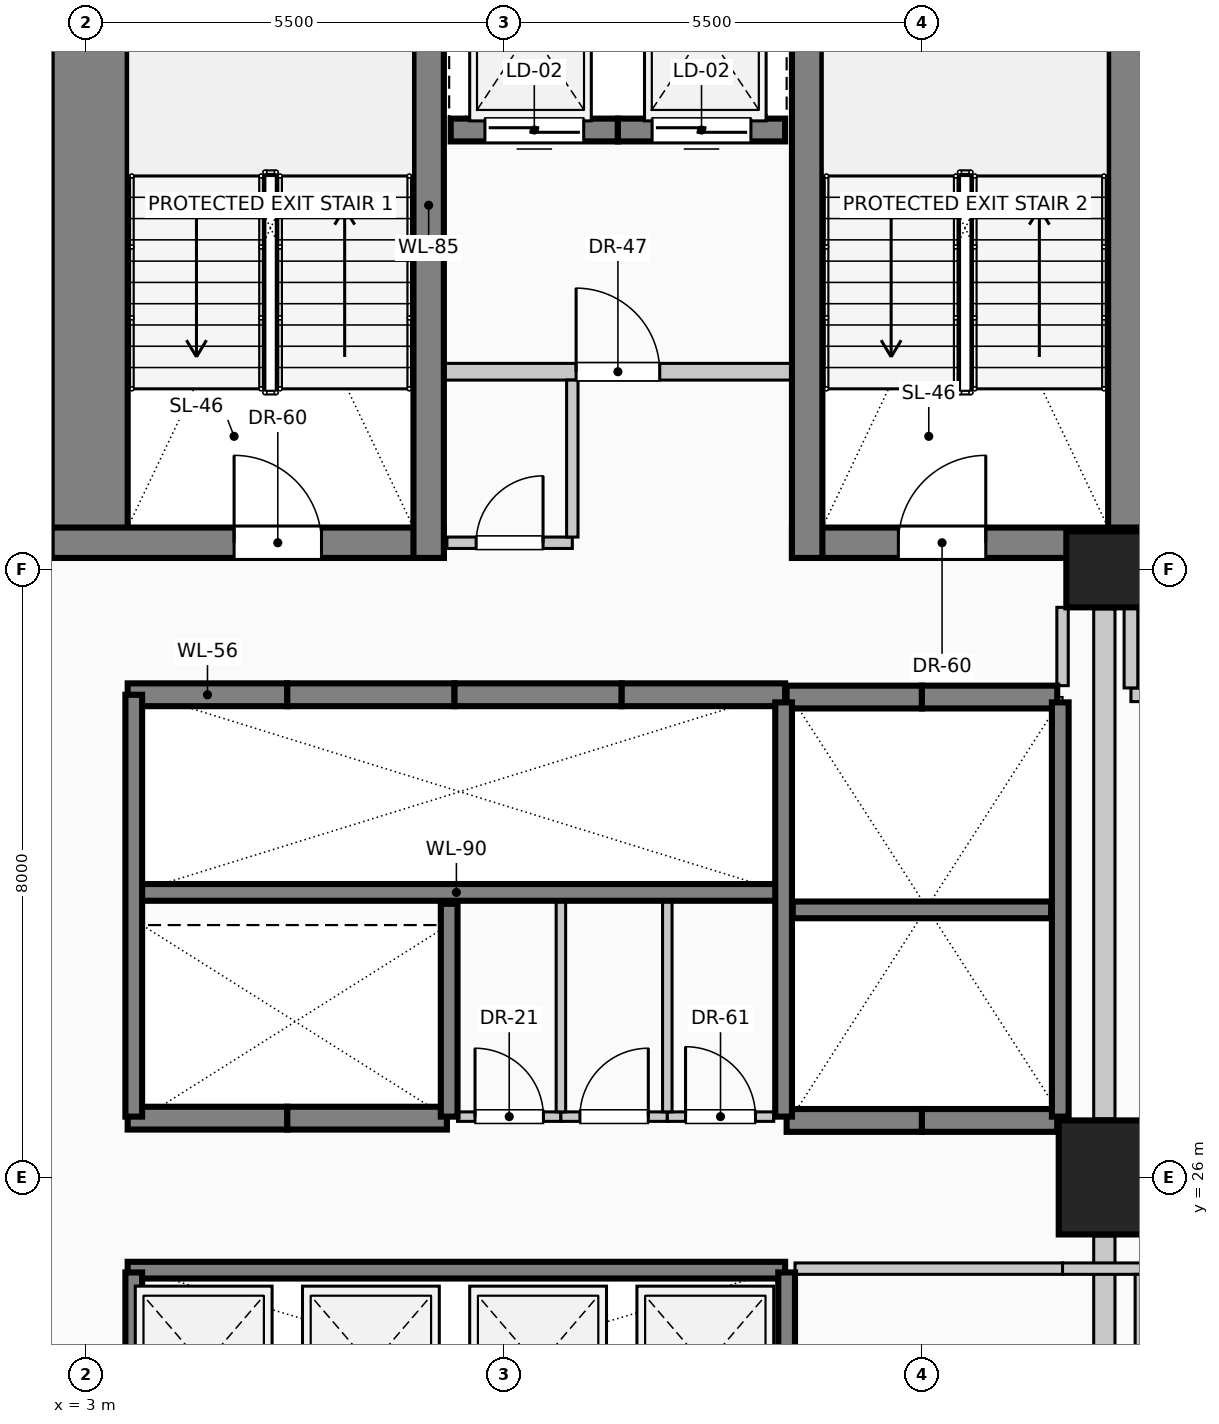
"""IFC4 building model, lengths in metres.
Left out: names, types, materials, properties, quantities, classifications, styles, units other than length and angle.
Written with IfcOpenShell. Run it as: python <this file> out.ifc"""

import sys

from ifc_helpers import new_model, si_unit, direction, frame, frame_2d, origin, origin_2d, place, context, subcontext, project, spatial, rectangle, circle, extrude, element, fill, save


model = new_model("IFC4")
c1 = context("Model", 3, precision=1e-05, world=origin(), true_north=direction((0.0, 1.0)))
c2 = subcontext(c1, "Body", "Model", "MODEL_VIEW")
j1 = project(units=[si_unit("LENGTHUNIT", "METRE"), si_unit("PLANEANGLEUNIT", "RADIAN")], contexts=[c1])
p1 = place(None, origin())
s1 = spatial("IfcSite", under=j1, at=p1, CompositionType="ELEMENT")
p2 = place(p1, origin())
s2 = spatial("IfcBuilding", under=s1, at=p2, CompositionType="ELEMENT")
p3 = place(p2, frame((0.0, 0.0, 42.6)))
s3 = spatial("IfcBuildingStorey", under=s2, at=p3, CompositionType="ELEMENT", Elevation=42.6)
for number, where, z_axis, x_axis in (
    (1, (3.05, 34.15, 0.0), (0.0, 0.0, 1.0), (0.0, 1.0, 0.0)),
    (2, (16.95, 34.15, 0.0), (0.0, 0.0, 1.0), (0.0, 1.0, 0.0)),
):
    element("IfcWall", number, at=place(p3, frame(where, z_axis=z_axis, x_axis=x_axis)), inside=s3, PredefinedType="SHEAR", context=c2, shape_type="SweptSolid", body=[
        extrude(rectangle(XDim=9.28, YDim=1.0, at=frame_2d((4.64, 0.0))), origin(), (0.0, 0.0, 1.0), 4.0),
    ])
p4 = place(p3, frame((2.55, 34.35, 0.0), z_axis=(0.0, 0.0, 1.0), x_axis=(1.0, 0.0, 0.0)))
e3 = element("IfcWall", 3, at=p4, inside=s3, PredefinedType="SHEAR", context=c2, shape_type="SweptSolid", body=[
    extrude(rectangle(XDim=5.16, YDim=0.4, at=frame_2d((2.58, 0.0))), origin(), (0.0, 0.0, 1.0), 4.0),
])
p5 = place(p4, frame((2.4, 0.0, 0.0)))
e4 = element("IfcOpeningElement", 4, at=p5, cuts=e3, PredefinedType="OPENING", context=c2, shape_type="SweptSolid", body=[
    extrude(rectangle(XDim=1.15, YDim=2.2, at=frame_2d((0.575, 1.1))), frame((0.0, 0.21, 0.0), z_axis=(0.0, -1.0, 0.0), x_axis=(1.0, 0.0, 0.0)), (0.0, 0.0, 1.0), 0.42),
])
p6 = place(p3, frame((12.29, 34.35, 0.0), z_axis=(0.0, 0.0, 1.0), x_axis=(1.0, 0.0, 0.0)))
e5 = element("IfcWall", 5, at=p6, inside=s3, PredefinedType="SHEAR", context=c2, shape_type="SweptSolid", body=[
    extrude(rectangle(XDim=5.16, YDim=0.4, at=frame_2d((2.58, 0.0))), origin(), (0.0, 0.0, 1.0), 4.0),
])
p7 = place(p6, frame((1.4, 0.0, 0.0)))
e6 = element("IfcOpeningElement", 6, at=p7, cuts=e5, PredefinedType="OPENING", context=c2, shape_type="SweptSolid", body=[
    extrude(rectangle(XDim=1.15, YDim=2.2, at=frame_2d((0.575, 1.1))), frame((0.0, 0.21, 0.0), z_axis=(0.0, -1.0, 0.0), x_axis=(1.0, 0.0, 0.0)), (0.0, 0.0, 1.0), 0.42),
])
for number, where, z_axis, x_axis in (
    (7, (7.51, 34.15, 0.0), (0.0, 0.0, 1.0), (0.0, 1.0, 0.0)),
    (8, (12.49, 34.15, 0.0), (0.0, 0.0, 1.0), (0.0, 1.0, 0.0)),
):
    element("IfcWall", number, at=place(p3, frame(where, z_axis=z_axis, x_axis=x_axis)), inside=s3, PredefinedType="SHEAR", context=c2, shape_type="SweptSolid", body=[
        extrude(rectangle(XDim=9.28, YDim=0.4, at=frame_2d((4.64, 0.0))), origin(), (0.0, 0.0, 1.0), 4.0),
    ])
p8 = place(p3, frame((16.4, 26.0, 0.0), z_axis=(0.0, 0.0, 1.0), x_axis=(1.0, 0.0, 0.0)))
e9 = element("IfcColumn", 9, at=p8, inside=s3, PredefinedType="COLUMN", context=c2, shape_type="SweptSolid", body=[
    extrude(rectangle(XDim=1.2, YDim=1.5, at=origin_2d()), origin(), (0.0, 0.0, 1.0), 4.0),
])
p9 = place(p3, frame((16.4, 34.0, 0.0), z_axis=(0.0, 0.0, 1.0), x_axis=(1.0, 0.0, 0.0)))
e10 = element("IfcColumn", 10, at=p9, inside=s3, PredefinedType="COLUMN", context=c2, shape_type="SweptSolid", body=[
    extrude(circle(Radius=0.5, at=origin_2d()), origin(), (0.0, 0.0, 1.0), 4.0),
])
p10 = place(p3, frame((16.4, 25.23, 0.0), z_axis=(0.0, 0.0, 1.0), x_axis=(0.0, -1.0, 0.0)))
e11 = element("IfcWall", 11, at=p10, inside=s3, PredefinedType="SOLIDWALL", context=c2, shape_type="SweptSolid", body=[
    extrude(rectangle(XDim=6.46, YDim=0.28, at=frame_2d((3.23, 0.0))), origin(), (0.0, 0.0, 1.0), 3.0),
])
p11 = place(p3, frame((16.4, 33.48, 0.0), z_axis=(0.0, 0.0, 1.0), x_axis=(0.0, -1.0, 0.0)))
e12 = element("IfcWall", 12, at=p11, inside=s3, PredefinedType="SOLIDWALL", context=c2, shape_type="SweptSolid", body=[
    extrude(rectangle(XDim=6.71, YDim=0.28, at=frame_2d((3.355, 0.0))), origin(), (0.0, 0.0, 1.0), 3.0),
])
for number, where, z_axis, x_axis in (
    (13, (14.0, 26.75, 0.0), (0.0, 0.0, 1.0), (-1.0, 0.0, 0.0)),
    (14, (15.78, 26.75, 0.0), (0.0, 0.0, 1.0), (-1.0, 0.0, 0.0)),
    (15, (12.22, 32.32, 0.0), (0.0, 0.0, 1.0), (1.0, 0.0, 0.0)),
    (16, (14.0, 32.32, 0.0), (0.0, 0.0, 1.0), (1.0, 0.0, 0.0)),
):
    element("IfcWall", number, at=place(p3, frame(where, z_axis=z_axis, x_axis=x_axis)), inside=s3, PredefinedType="SOLIDWALL", context=c2, shape_type="SweptSolid", body=[
        extrude(rectangle(XDim=1.78, YDim=0.3, at=frame_2d((0.89, 0.0))), origin(), (0.0, 0.0, 1.0), 4.0),
    ])
p12 = place(p3, frame((3.55, 32.35, 0.0), z_axis=(0.0, 0.0, 1.0), x_axis=(1.0, 0.0, 0.0)))
e17 = element("IfcWall", 17, at=p12, inside=s3, PredefinedType="SOLIDWALL", context=c2, shape_type="SweptSolid", body=[
    extrude(rectangle(XDim=2.1, YDim=0.3, at=frame_2d((1.05, 0.0))), origin(), (0.0, 0.0, 1.0), 4.0),
])
p13 = place(p3, frame((5.65, 32.35, 0.0), z_axis=(0.0, 0.0, 1.0), x_axis=(1.0, 0.0, 0.0)))
e18 = element("IfcWall", 18, at=p13, inside=s3, PredefinedType="SOLIDWALL", context=c2, shape_type="SweptSolid", body=[
    extrude(rectangle(XDim=2.2, YDim=0.3, at=frame_2d((1.1, 0.0))), origin(), (0.0, 0.0, 1.0), 4.0),
])
p14 = place(p3, frame((7.85, 32.35, 0.0), z_axis=(0.0, 0.0, 1.0), x_axis=(1.0, 0.0, 0.0)))
e19 = element("IfcWall", 19, at=p14, inside=s3, PredefinedType="SOLIDWALL", context=c2, shape_type="SweptSolid", body=[
    extrude(rectangle(XDim=2.2, YDim=0.3, at=frame_2d((1.1, 0.0))), origin(), (0.0, 0.0, 1.0), 4.0),
])
p15 = place(p3, frame((10.05, 32.35, 0.0), z_axis=(0.0, 0.0, 1.0), x_axis=(1.0, 0.0, 0.0)))
e20 = element("IfcWall", 20, at=p15, inside=s3, PredefinedType="SOLIDWALL", context=c2, shape_type="SweptSolid", body=[
    extrude(rectangle(XDim=2.15, YDim=0.3, at=frame_2d((1.075, 0.0))), origin(), (0.0, 0.0, 1.0), 4.0),
])
p16 = place(p3, frame((5.65, 26.78, 0.0), z_axis=(0.0, 0.0, 1.0), x_axis=(-1.0, 0.0, 0.0)))
e21 = element("IfcWall", 21, at=p16, inside=s3, PredefinedType="SOLIDWALL", context=c2, shape_type="SweptSolid", body=[
    extrude(rectangle(XDim=2.1, YDim=0.3, at=frame_2d((1.05, 0.0))), origin(), (0.0, 0.0, 1.0), 4.0),
])
p17 = place(p3, frame((7.75, 26.78, 0.0), z_axis=(0.0, 0.0, 1.0), x_axis=(-1.0, 0.0, 0.0)))
e22 = element("IfcWall", 22, at=p17, inside=s3, PredefinedType="SOLIDWALL", context=c2, shape_type="SweptSolid", body=[
    extrude(rectangle(XDim=2.1, YDim=0.3, at=frame_2d((1.05, 0.0))), origin(), (0.0, 0.0, 1.0), 4.0),
])
p18 = place(p3, frame((10.0, 39.78, 0.0), z_axis=(0.0, 0.0, 1.0), x_axis=(-1.0, 0.0, 0.0)))
e23 = element("IfcWall", 23, at=p18, inside=s3, PredefinedType="SOLIDWALL", context=c2, shape_type="SweptSolid", body=[
    extrude(rectangle(XDim=2.2, YDim=0.3, at=frame_2d((1.1, 0.0))), origin(), (0.0, 0.0, 1.0), 4.0),
])
p19 = place(p18, frame((0.45, 0.0, 0.0)))
e24 = element("IfcOpeningElement", 24, at=p19, cuts=e23, PredefinedType="OPENING", context=c2, shape_type="SweptSolid", body=[
    extrude(rectangle(XDim=1.3, YDim=2.25, at=frame_2d((0.65, 1.125))), frame((0.0, 0.16, 0.0), z_axis=(0.0, -1.0, 0.0), x_axis=(1.0, 0.0, 0.0)), (0.0, 0.0, 1.0), 0.32),
])
p20 = place(p3, frame((12.2, 39.78, 0.0), z_axis=(0.0, 0.0, 1.0), x_axis=(-1.0, 0.0, 0.0)))
e25 = element("IfcWall", 25, at=p20, inside=s3, PredefinedType="SOLIDWALL", context=c2, shape_type="SweptSolid", body=[
    extrude(rectangle(XDim=2.2, YDim=0.3, at=frame_2d((1.1, 0.0))), origin(), (0.0, 0.0, 1.0), 4.0),
])
p21 = place(p20, frame((0.45, 0.0, 0.0)))
e26 = element("IfcOpeningElement", 26, at=p21, cuts=e25, PredefinedType="OPENING", context=c2, shape_type="SweptSolid", body=[
    extrude(rectangle(XDim=1.3, YDim=2.25, at=frame_2d((0.65, 1.125))), frame((0.0, 0.16, 0.0), z_axis=(0.0, -1.0, 0.0), x_axis=(1.0, 0.0, 0.0)), (0.0, 0.0, 1.0), 0.32),
])
p22 = place(p3, frame((3.55, 29.75, 0.0), z_axis=(0.0, 0.0, 1.0), x_axis=(1.0, 0.0, 0.0)))
e27 = element("IfcWall", 27, at=p22, inside=s3, PredefinedType="SOLIDWALL", context=c2, shape_type="SweptSolid", body=[
    extrude(rectangle(XDim=8.65, YDim=0.22, at=frame_2d((4.325, 0.0))), origin(), (0.0, 0.0, 1.0), 4.0),
])
p23 = place(p3, frame((3.63, 26.8, 0.0), z_axis=(0.0, 0.0, 1.0), x_axis=(0.0, 1.0, 0.0)))
e28 = element("IfcWall", 28, at=p23, inside=s3, PredefinedType="SOLIDWALL", context=c2, shape_type="SweptSolid", body=[
    extrude(rectangle(XDim=5.55, YDim=0.22, at=frame_2d((2.775, 0.0))), origin(), (0.0, 0.0, 1.0), 4.0),
])
p24 = place(p3, frame((7.78, 26.8, 0.0), z_axis=(0.0, 0.0, 1.0), x_axis=(0.0, 1.0, 0.0)))
e29 = element("IfcWall", 29, at=p24, inside=s3, PredefinedType="SOLIDWALL", context=c2, shape_type="SweptSolid", body=[
    extrude(rectangle(XDim=2.8, YDim=0.22, at=frame_2d((1.4, 0.0))), origin(), (0.0, 0.0, 1.0), 4.0),
])
for number, where, z_axis, x_axis in (
    (30, (12.18, 26.8, 0.0), (0.0, 0.0, 1.0), (0.0, 1.0, 0.0)),
    (31, (15.82, 26.8, 0.0), (0.0, 0.0, 1.0), (0.0, 1.0, 0.0)),
):
    element("IfcWall", number, at=place(p3, frame(where, z_axis=z_axis, x_axis=x_axis)), inside=s3, PredefinedType="SOLIDWALL", context=c2, shape_type="SweptSolid", body=[
        extrude(rectangle(XDim=5.45, YDim=0.22, at=frame_2d((2.725, 0.0))), origin(), (0.0, 0.0, 1.0), 4.0),
    ])
p25 = place(p3, frame((12.3, 29.52, 0.0), z_axis=(0.0, 0.0, 1.0), x_axis=(1.0, 0.0, 0.0)))
e32 = element("IfcWall", 32, at=p25, inside=s3, PredefinedType="SOLIDWALL", context=c2, shape_type="SweptSolid", body=[
    extrude(rectangle(XDim=3.4, YDim=0.22, at=frame_2d((1.7, 0.0))), origin(), (0.0, 0.0, 1.0), 4.0),
])
p26 = place(p3, frame((3.55, 24.78, 0.0), z_axis=(0.0, 0.0, 1.0), x_axis=(1.0, 0.0, 0.0)))
e33 = element("IfcWall", 33, at=p26, inside=s3, PredefinedType="SOLIDWALL", context=c2, shape_type="SweptSolid", body=[
    extrude(rectangle(XDim=8.65, YDim=0.22, at=frame_2d((4.325, 0.0))), origin(), (0.0, 0.0, 1.0), 4.0),
])
for number, where, z_axis, x_axis in (
    (34, (3.63, 22.3, 0.0), (0.0, 0.0, 1.0), (0.0, 1.0, 0.0)),
    (35, (12.22, 22.3, 0.0), (0.0, 0.0, 1.0), (0.0, 1.0, 0.0)),
):
    element("IfcWall", number, at=place(p3, frame(where, z_axis=z_axis, x_axis=x_axis)), inside=s3, PredefinedType="SOLIDWALL", context=c2, shape_type="SweptSolid", body=[
        extrude(rectangle(XDim=2.45, YDim=0.22, at=frame_2d((1.225, 0.0))), origin(), (0.0, 0.0, 1.0), 4.0),
    ])
p27 = place(p3, frame((7.51, 36.6, 0.0), z_axis=(0.0, 0.0, 1.0), x_axis=(1.0, 0.0, 0.0)))
e36 = element("IfcWall", 36, at=p27, inside=s3, PredefinedType="PARTITIONING", context=c2, shape_type="SweptSolid", body=[
    extrude(rectangle(XDim=4.98, YDim=0.22, at=frame_2d((2.49, 0.0))), origin(), (0.0, 0.0, 1.0), 3.7),
])
p28 = place(p27, frame((1.94, 0.0, 0.0)))
e37 = element("IfcOpeningElement", 37, at=p28, cuts=e36, PredefinedType="OPENING", context=c2, shape_type="SweptSolid", body=[
    extrude(rectangle(XDim=1.1, YDim=2.2, at=frame_2d((0.55, 1.1))), frame((0.0, 0.12, 0.0), z_axis=(0.0, -1.0, 0.0), x_axis=(1.0, 0.0, 0.0)), (0.0, 0.0, 1.0), 0.24),
])
p29 = place(p3, frame((12.33, 24.8, 0.0), z_axis=(0.0, 0.0, 1.0), x_axis=(1.0, 0.0, 0.0)))
e38 = element("IfcWall", 38, at=p29, inside=s3, PredefinedType="PARTITIONING", context=c2, shape_type="SweptSolid", body=[
    extrude(rectangle(XDim=3.52, YDim=0.15, at=frame_2d((1.76, 0.0))), origin(), (0.0, 0.0, 1.0), 3.7),
])
p30 = place(p3, frame((15.85, 24.8, 0.0), z_axis=(0.0, 0.0, 1.0), x_axis=(1.0, 0.0, 0.0)))
e39 = element("IfcWall", 39, at=p30, inside=s3, PredefinedType="PARTITIONING", context=c2, shape_type="SweptSolid", body=[
    extrude(rectangle(XDim=1.03, YDim=0.15, at=frame_2d((0.515, 0.0))), origin(), (0.0, 0.0, 1.0), 3.7),
])
p31 = place(p3, frame((7.89, 26.8, 0.0), z_axis=(0.0, 0.0, 1.0), x_axis=(1.0, 0.0, 0.0)))
e40 = element("IfcWall", 40, at=p31, inside=s3, PredefinedType="PARTITIONING", context=c2, shape_type="SweptSolid", body=[
    extrude(rectangle(XDim=1.36, YDim=0.125, at=frame_2d((0.68, 0.0))), origin(), (0.0, 0.0, 1.0), 3.7),
])
p32 = place(p31, frame((0.23, 0.0, 0.0)))
e41 = element("IfcOpeningElement", 41, at=p32, cuts=e40, PredefinedType="OPENING", context=c2, shape_type="SweptSolid", body=[
    extrude(rectangle(XDim=0.9, YDim=2.1, at=frame_2d((0.45, 1.05))), frame((0.0, 0.073, 0.0), z_axis=(0.0, -1.0, 0.0), x_axis=(1.0, 0.0, 0.0)), (0.0, 0.0, 1.0), 0.145),
])
p33 = place(p3, frame((9.25, 26.8, 0.0), z_axis=(0.0, 0.0, 1.0), x_axis=(1.0, 0.0, 0.0)))
e42 = element("IfcWall", 42, at=p33, inside=s3, PredefinedType="PARTITIONING", context=c2, shape_type="SweptSolid", body=[
    extrude(rectangle(XDim=1.4, YDim=0.125, at=frame_2d((0.7, 0.0))), origin(), (0.0, 0.0, 1.0), 3.7),
])
p34 = place(p33, frame((0.25, 0.0, 0.0)))
e43 = element("IfcOpeningElement", 43, at=p34, cuts=e42, PredefinedType="OPENING", context=c2, shape_type="SweptSolid", body=[
    extrude(rectangle(XDim=0.9, YDim=2.1, at=frame_2d((0.45, 1.05))), frame((0.0, 0.073, 0.0), z_axis=(0.0, -1.0, 0.0), x_axis=(1.0, 0.0, 0.0)), (0.0, 0.0, 1.0), 0.145),
])
p35 = place(p3, frame((10.65, 26.8, 0.0), z_axis=(0.0, 0.0, 1.0), x_axis=(1.0, 0.0, 0.0)))
e44 = element("IfcWall", 44, at=p35, inside=s3, PredefinedType="PARTITIONING", context=c2, shape_type="SweptSolid", body=[
    extrude(rectangle(XDim=1.4, YDim=0.125, at=frame_2d((0.7, 0.0))), origin(), (0.0, 0.0, 1.0), 3.7),
])
p36 = place(p35, frame((0.24, 0.0, 0.0)))
e45 = element("IfcOpeningElement", 45, at=p36, cuts=e44, PredefinedType="OPENING", context=c2, shape_type="SweptSolid", body=[
    extrude(rectangle(XDim=0.92, YDim=2.1, at=frame_2d((0.46, 1.05))), frame((0.0, 0.073, 0.0), z_axis=(0.0, -1.0, 0.0), x_axis=(1.0, 0.0, 0.0)), (0.0, 0.0, 1.0), 0.145),
])
p37 = place(p3, frame((16.75, 32.35, 0.0), z_axis=(0.0, 0.0, 1.0), x_axis=(1.0, 0.0, 0.0)))
e46 = element("IfcWall", 46, at=p37, inside=s3, PredefinedType="PARTITIONING", context=c2, shape_type="SweptSolid", body=[
    extrude(rectangle(XDim=2.45, YDim=0.18, at=frame_2d((1.225, 0.0))), origin(), (0.0, 0.0, 1.0), 3.7),
])
p38 = place(p3, frame((7.75, 34.35, 0.0), z_axis=(0.0, 0.0, 1.0), x_axis=(1.0, 0.0, 0.0)))
e47 = element("IfcWall", 47, at=p38, inside=s3, PredefinedType="PARTITIONING", context=c2, shape_type="SweptSolid", body=[
    extrude(rectangle(XDim=1.65, YDim=0.15, at=frame_2d((0.825, 0.0))), origin(), (0.0, 0.0, 1.0), 3.7),
])
p39 = place(p38, frame((0.385, 0.0, 0.0)))
e48 = element("IfcOpeningElement", 48, at=p39, cuts=e47, PredefinedType="OPENING", context=c2, shape_type="SweptSolid", body=[
    extrude(rectangle(XDim=0.88, YDim=2.1, at=frame_2d((0.44, 1.05))), frame((0.0, 0.085, 0.0), z_axis=(0.0, -1.0, 0.0), x_axis=(1.0, 0.0, 0.0)), (0.0, 0.0, 1.0), 0.17),
])
p40 = place(p3, frame((9.25, 26.863, 0.0), z_axis=(0.0, 0.0, 1.0), x_axis=(0.0, 1.0, 0.0)))
e49 = element("IfcWall", 49, at=p40, inside=s3, PredefinedType="PARTITIONING", context=c2, shape_type="SweptSolid", body=[
    extrude(rectangle(XDim=2.777, YDim=0.125, at=frame_2d((1.389, 0.0))), origin(), (0.0, 0.0, 1.0), 3.7),
])
p41 = place(p3, frame((9.4, 34.425, 0.0), z_axis=(0.0, 0.0, 1.0), x_axis=(0.0, 1.0, 0.0)))
e50 = element("IfcWall", 50, at=p41, inside=s3, PredefinedType="PARTITIONING", context=c2, shape_type="SweptSolid", body=[
    extrude(rectangle(XDim=2.065, YDim=0.15, at=frame_2d((1.032, 0.0))), origin(), (0.0, 0.0, 1.0), 3.7),
])
p42 = place(p3, frame((10.65, 26.863, 0.0), z_axis=(0.0, 0.0, 1.0), x_axis=(0.0, 1.0, 0.0)))
e51 = element("IfcWall", 51, at=p42, inside=s3, PredefinedType="PARTITIONING", context=c2, shape_type="SweptSolid", body=[
    extrude(rectangle(XDim=2.777, YDim=0.125, at=frame_2d((1.389, 0.0))), origin(), (0.0, 0.0, 1.0), 3.7),
])
p43 = place(p3, frame((15.85, 32.47, 0.0), z_axis=(0.0, 0.0, 1.0), x_axis=(0.0, 1.0, 0.0)))
e52 = element("IfcWall", 52, at=p43, inside=s3, PredefinedType="PARTITIONING", context=c2, shape_type="SweptSolid", body=[
    extrude(rectangle(XDim=1.03, YDim=0.15, at=frame_2d((0.515, 0.0))), origin(), (0.0, 0.0, 1.0), 3.7),
])
p44 = place(p3, frame((16.75, 32.44, 0.0), z_axis=(0.0, 0.0, 1.0), x_axis=(0.0, 1.0, 0.0)))
e53 = element("IfcWall", 53, at=p44, inside=s3, PredefinedType="PARTITIONING", context=c2, shape_type="SweptSolid", body=[
    extrude(rectangle(XDim=1.06, YDim=0.18, at=frame_2d((0.53, 0.0))), origin(), (0.0, 0.0, 1.0), 3.7),
])
p45 = place(p3, frame((16.88, 18.75, 0.0), z_axis=(0.0, 0.0, 1.0), x_axis=(0.0, 1.0, 0.0)))
e54 = element("IfcWall", 54, at=p45, inside=s3, PredefinedType="PARTITIONING", context=c2, shape_type="SweptSolid", body=[
    extrude(rectangle(XDim=5.975, YDim=0.15, at=frame_2d((2.988, 0.0))), origin(), (0.0, 0.0, 1.0), 3.7),
])
p46 = place(p19, origin())
e55 = element("IfcDoor", 55, at=p46, inside=s3, OperationType="SLIDING_TO_LEFT", PredefinedType="DOOR", context=c2, shape_type="SweptSolid", body=[
    extrude(rectangle(XDim=1.3, YDim=2.25, at=frame_2d((0.65, 1.125))), frame((0.0, 0.025, 0.0), z_axis=(0.0, -1.0, 0.0), x_axis=(1.0, 0.0, 0.0)), (0.0, 0.0, 1.0), 0.05),
])
fill(e24, e55)
p47 = place(p21, origin())
e56 = element("IfcDoor", 56, at=p47, inside=s3, OperationType="SLIDING_TO_RIGHT", PredefinedType="DOOR", context=c2, shape_type="SweptSolid", body=[
    extrude(rectangle(XDim=1.3, YDim=2.25, at=frame_2d((0.65, 1.125))), frame((0.0, 0.025, 0.0), z_axis=(0.0, -1.0, 0.0), x_axis=(1.0, 0.0, 0.0)), (0.0, 0.0, 1.0), 0.05),
])
fill(e26, e56)
p48 = place(p5, origin())
e57 = element("IfcDoor", 57, at=p48, inside=s3, OperationType="SINGLE_SWING_LEFT", PredefinedType="DOOR", context=c2, shape_type="SweptSolid", body=[
    extrude(rectangle(XDim=1.15, YDim=2.2, at=frame_2d((0.575, 1.1))), frame((0.0, 0.025, 0.0), z_axis=(0.0, -1.0, 0.0), x_axis=(1.0, 0.0, 0.0)), (0.0, 0.0, 1.0), 0.05),
])
fill(e4, e57)
p49 = place(p7, origin())
e58 = element("IfcDoor", 58, at=p49, inside=s3, OperationType="SINGLE_SWING_RIGHT", PredefinedType="DOOR", context=c2, shape_type="SweptSolid", body=[
    extrude(rectangle(XDim=1.15, YDim=2.2, at=frame_2d((0.575, 1.1))), frame((0.0, 0.025, 0.0), z_axis=(0.0, -1.0, 0.0), x_axis=(1.0, 0.0, 0.0)), (0.0, 0.0, 1.0), 0.05),
])
fill(e6, e58)
p50 = place(p28, origin())
e59 = element("IfcDoor", 59, at=p50, inside=s3, OperationType="SINGLE_SWING_LEFT", PredefinedType="DOOR", context=c2, shape_type="SweptSolid", body=[
    extrude(rectangle(XDim=1.1, YDim=2.2, at=frame_2d((0.55, 1.1))), frame((0.0, 0.025, 0.0), z_axis=(0.0, -1.0, 0.0), x_axis=(1.0, 0.0, 0.0)), (0.0, 0.0, 1.0), 0.05),
])
fill(e37, e59)
p51 = place(p32, origin())
e60 = element("IfcDoor", 60, at=p51, inside=s3, OperationType="SINGLE_SWING_LEFT", PredefinedType="DOOR", context=c2, shape_type="SweptSolid", body=[
    extrude(rectangle(XDim=0.9, YDim=2.1, at=frame_2d((0.45, 1.05))), frame((0.0, 0.025, 0.0), z_axis=(0.0, -1.0, 0.0), x_axis=(1.0, 0.0, 0.0)), (0.0, 0.0, 1.0), 0.05),
])
fill(e41, e60)
p52 = place(p34, origin())
e61 = element("IfcDoor", 61, at=p52, inside=s3, OperationType="SINGLE_SWING_RIGHT", PredefinedType="DOOR", context=c2, shape_type="SweptSolid", body=[
    extrude(rectangle(XDim=0.9, YDim=2.1, at=frame_2d((0.45, 1.05))), frame((0.0, 0.025, 0.0), z_axis=(0.0, -1.0, 0.0), x_axis=(1.0, 0.0, 0.0)), (0.0, 0.0, 1.0), 0.05),
])
fill(e43, e61)
p53 = place(p36, origin())
e62 = element("IfcDoor", 62, at=p53, inside=s3, OperationType="SINGLE_SWING_LEFT", PredefinedType="DOOR", context=c2, shape_type="SweptSolid", body=[
    extrude(rectangle(XDim=0.92, YDim=2.1, at=frame_2d((0.46, 1.05))), frame((0.0, 0.025, 0.0), z_axis=(0.0, -1.0, 0.0), x_axis=(1.0, 0.0, 0.0)), (0.0, 0.0, 1.0), 0.05),
])
fill(e45, e62)
p54 = place(p39, origin())
e63 = element("IfcDoor", 63, at=p54, inside=s3, OperationType="SINGLE_SWING_RIGHT", PredefinedType="DOOR", context=c2, shape_type="SweptSolid", body=[
    extrude(rectangle(XDim=0.88, YDim=2.1, at=frame_2d((0.44, 1.05))), frame((0.0, 0.025, 0.0), z_axis=(0.0, -1.0, 0.0), x_axis=(1.0, 0.0, 0.0)), (0.0, 0.0, 1.0), 0.05),
])
fill(e48, e63)
save(model, sys.argv[1])
